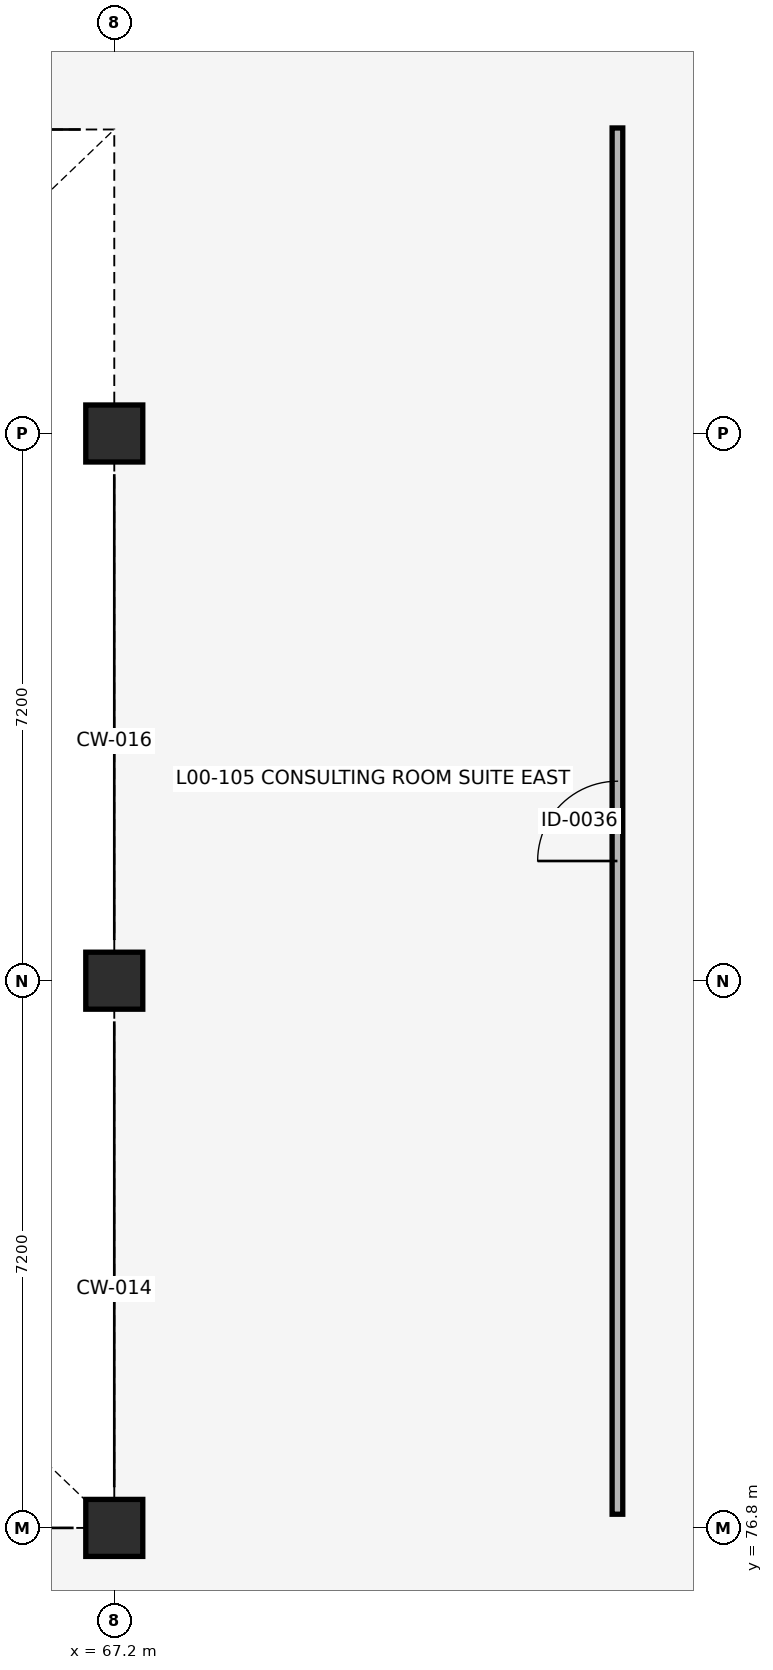
"""IFC4 building model, lengths in metres.
Left out: names, types, materials, properties, quantities, classifications, styles, units other than length and angle.
Written with IfcOpenShell. Run it as: python <this file> out.ifc"""

import sys

from ifc_helpers import new_model, si_unit, direction, frame, frame_2d, origin, origin_2d, place, context, subcontext, project, spatial, rectangle, circle, extrude, element, fill, save


model = new_model("IFC4")
c1 = context("Model", 3, precision=1e-05, world=origin(), true_north=direction((0.0, 1.0)))
c2 = subcontext(c1, "Body", "Model", "MODEL_VIEW")
j1 = project(units=[si_unit("LENGTHUNIT", "METRE"), si_unit("PLANEANGLEUNIT", "RADIAN")], contexts=[c1])
p1 = place(None, origin())
s1 = spatial("IfcSite", under=j1, at=p1, CompositionType="ELEMENT")
p2 = place(p1, origin())
s2 = spatial("IfcBuilding", under=s1, at=p2, CompositionType="ELEMENT")
p3 = place(p2, origin())
s3 = spatial("IfcBuildingStorey", under=s2, at=p3, CompositionType="ELEMENT", Elevation=0.0)
for number, where, z_axis, x_axis in (
    (1, (67.2, 76.8, -0.44), (0.0, 0.0, 1.0), (1.0, 0.0, 0.0)),
    (2, (67.2, 84.0, -0.44), (0.0, 0.0, 1.0), (1.0, 0.0, 0.0)),
    (3, (67.2, 91.2, -0.44), (0.0, 0.0, 1.0), (1.0, 0.0, 0.0)),
):
    element("IfcColumn", number, at=place(p3, frame(where, z_axis=z_axis, x_axis=x_axis)), inside=s3, PredefinedType="COLUMN", context=c2, shape_type="SweptSolid", body=[
        extrude(circle(Radius=0.375, at=origin_2d()), origin(), (0.0, 0.0, 1.0), 4.86),
    ])
p4 = place(p3, frame((73.82, 76.98, 0.0), z_axis=(0.0, 0.0, 1.0), x_axis=(0.0, 1.0, 0.0)))
e4 = element("IfcWall", 4, at=p4, inside=s3, PredefinedType="PARTITIONING", context=c2, shape_type="SweptSolid", body=[
    extrude(rectangle(XDim=18.24, YDim=0.14, at=frame_2d((9.12, 0.0))), origin(), (0.0, 0.0, 1.0), 3.46),
])
p5 = place(p4, frame((8.595, 0.0, 0.0)))
e5 = element("IfcOpeningElement", 5, at=p5, cuts=e4, PredefinedType="OPENING", context=c2, shape_type="SweptSolid", body=[
    extrude(rectangle(XDim=1.05, YDim=2.1, at=frame_2d((0.525, 1.05))), frame((0.0, 0.08, 0.0), z_axis=(0.0, -1.0, 0.0), x_axis=(1.0, 0.0, 0.0)), (0.0, 0.0, 1.0), 0.16),
])
p6 = place(p5, origin())
e6 = element("IfcDoor", 6, at=p6, inside=s3, OperationType="SINGLE_SWING_LEFT", PredefinedType="DOOR", context=c2, shape_type="SweptSolid", body=[
    extrude(rectangle(XDim=1.05, YDim=2.1, at=frame_2d((0.525, 1.05))), frame((0.0, 0.025, 0.0), z_axis=(0.0, -1.0, 0.0), x_axis=(1.0, 0.0, 0.0)), (0.0, 0.0, 1.0), 0.05),
])
fill(e5, e6)
save(model, sys.argv[1])
